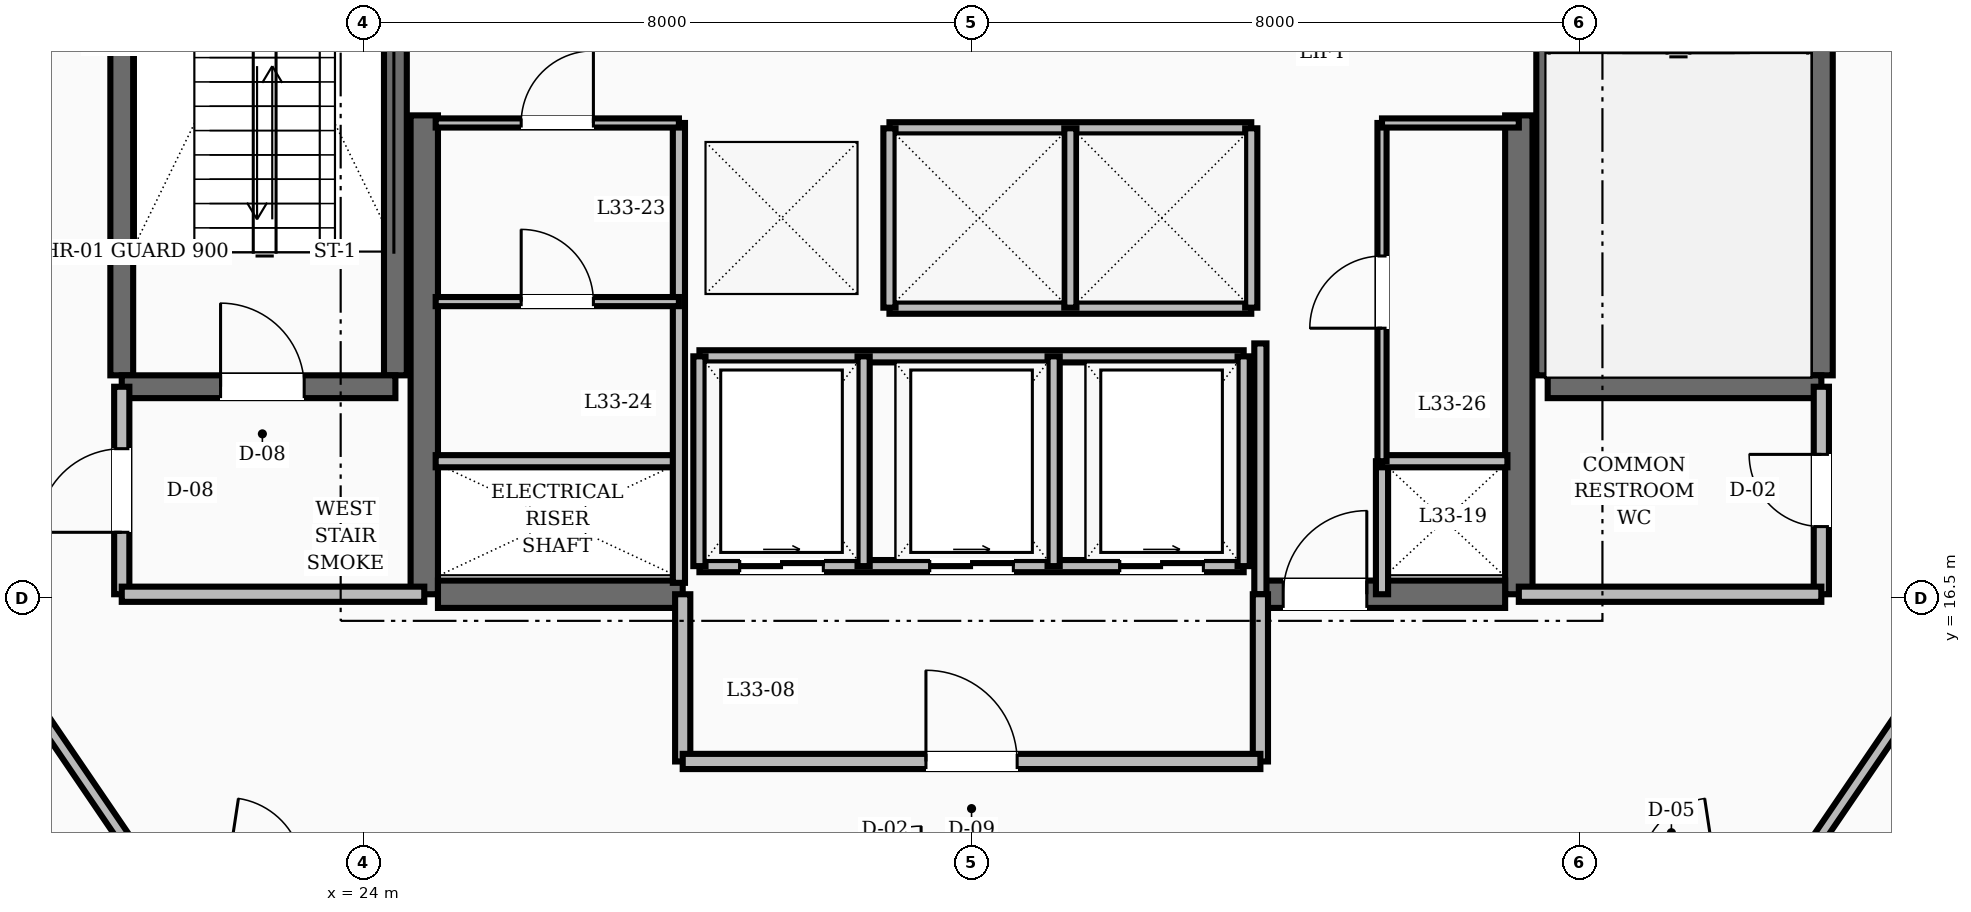
"""IFC4 building model, lengths in metres.
Left out: names, types, materials, properties, quantities, classifications, styles, units other than length and angle.
Written with IfcOpenShell. Run it as: python <this file> out.ifc"""

import sys

from ifc_helpers import new_model, si_unit, direction, frame, frame_2d, origin, place, context, subcontext, project, spatial, rectangle, extrude, element, fill, save


model = new_model("IFC4")
c1 = context("Model", 3, precision=1e-05, world=origin(), true_north=direction((0.0, 1.0)))
c2 = subcontext(c1, "Body", "Model", "MODEL_VIEW")
j1 = project(units=[si_unit("LENGTHUNIT", "METRE"), si_unit("PLANEANGLEUNIT", "RADIAN")], contexts=[c1])
p1 = place(None, origin())
s1 = spatial("IfcSite", under=j1, at=p1, CompositionType="ELEMENT")
p2 = place(p1, origin())
s2 = spatial("IfcBuilding", under=s1, at=p2, CompositionType="ELEMENT")
p3 = place(p2, frame((0.0, 0.0, 131.6)))
s3 = spatial("IfcBuildingStorey", under=s2, at=p3, CompositionType="ELEMENT", Elevation=131.6)
for number, where, z_axis, x_axis in (
    (1, (24.8, 16.55, 0.0), (0.0, 0.0, 1.0), (0.0, 1.0, 0.0)),
    (2, (39.2, 16.55, 0.0), (0.0, 0.0, 1.0), (0.0, 1.0, 0.0)),
):
    element("IfcWall", number, at=place(p3, frame(where, z_axis=z_axis, x_axis=x_axis)), inside=s3, PredefinedType="SHEAR", context=c2, shape_type="SweptSolid", body=[
        extrude(rectangle(XDim=6.3, YDim=0.36, at=frame_2d((3.15, 0.0))), origin(), (0.0, 0.0, 1.0), 3.6),
    ])
p4 = place(p3, frame((24.98, 16.55, 0.0), z_axis=(0.0, 0.0, 1.0), x_axis=(1.0, 0.0, 0.0)))
e3 = element("IfcWall", 3, at=p4, inside=s3, PredefinedType="SHEAR", context=c2, shape_type="SweptSolid", body=[
    extrude(rectangle(XDim=3.22, YDim=0.36, at=frame_2d((1.61, 0.0))), origin(), (0.0, 0.0, 1.0), 3.6),
])
p5 = place(p3, frame((35.8, 16.55, 0.0), z_axis=(0.0, 0.0, 1.0), x_axis=(1.0, 0.0, 0.0)))
e4 = element("IfcWall", 4, at=p5, inside=s3, PredefinedType="SHEAR", context=c2, shape_type="SweptSolid", body=[
    extrude(rectangle(XDim=3.22, YDim=0.36, at=frame_2d((1.61, 0.0))), origin(), (0.0, 0.0, 1.0), 3.6),
])
p6 = place(p5, frame((0.3, 0.0, 0.0)))
e5 = element("IfcOpeningElement", 5, at=p6, cuts=e4, PredefinedType="OPENING", context=c2, shape_type="SweptSolid", body=[
    extrude(rectangle(XDim=1.1, YDim=2.1, at=frame_2d((0.55, 1.05))), frame((0.0, 0.19, 0.0), z_axis=(0.0, -1.0, 0.0), x_axis=(1.0, 0.0, 0.0)), (0.0, 0.0, 1.0), 0.38),
])
for number, where, z_axis, x_axis in (
    (6, (20.82, 19.43, 0.0), (0.0, 0.0, 1.0), (0.0, 1.0, 0.0)),
    (7, (24.42, 19.43, 0.0), (0.0, 0.0, 1.0), (0.0, 1.0, 0.0)),
):
    element("IfcWall", number, at=place(p3, frame(where, z_axis=z_axis, x_axis=x_axis)), inside=s3, PredefinedType="SHEAR", context=c2, shape_type="SweptSolid", body=[
        extrude(rectangle(XDim=8.74, YDim=0.3, at=frame_2d((4.37, 0.0))), origin(), (0.0, 0.0, 1.0), 3.6),
    ])
p7 = place(p3, frame((20.82, 19.28, 0.0), z_axis=(0.0, 0.0, 1.0), x_axis=(1.0, 0.0, 0.0)))
e8 = element("IfcWall", 8, at=p7, inside=s3, PredefinedType="SHEAR", context=c2, shape_type="SweptSolid", body=[
    extrude(rectangle(XDim=3.6, YDim=0.3, at=frame_2d((1.8, 0.0))), origin(), (0.0, 0.0, 1.0), 3.6),
])
p8 = place(p7, frame((1.3, 0.0, 0.0)))
e9 = element("IfcOpeningElement", 9, at=p8, cuts=e8, PredefinedType="OPENING", context=c2, shape_type="SweptSolid", body=[
    extrude(rectangle(XDim=1.1, YDim=2.1, at=frame_2d((0.55, 1.05))), frame((0.0, 0.16, 0.0), z_axis=(0.0, -1.0, 0.0), x_axis=(1.0, 0.0, 0.0)), (0.0, 0.0, 1.0), 0.32),
])
for number, where, z_axis, x_axis in (
    (10, (43.18, 19.43, 0.0), (0.0, 0.0, 1.0), (0.0, 1.0, 0.0)),
    (11, (39.58, 19.43, 0.0), (0.0, 0.0, 1.0), (0.0, 1.0, 0.0)),
):
    element("IfcWall", number, at=place(p3, frame(where, z_axis=z_axis, x_axis=x_axis)), inside=s3, PredefinedType="SHEAR", context=c2, shape_type="SweptSolid", body=[
        extrude(rectangle(XDim=8.74, YDim=0.3, at=frame_2d((4.37, 0.0))), origin(), (0.0, 0.0, 1.0), 3.6),
    ])
p9 = place(p3, frame((39.58, 19.28, 0.0), z_axis=(0.0, 0.0, 1.0), x_axis=(1.0, 0.0, 0.0)))
e12 = element("IfcWall", 12, at=p9, inside=s3, PredefinedType="SHEAR", context=c2, shape_type="SweptSolid", body=[
    extrude(rectangle(XDim=3.6, YDim=0.3, at=frame_2d((1.8, 0.0))), origin(), (0.0, 0.0, 1.0), 3.6),
])
p10 = place(p3, frame((20.82, 16.55, 0.0), z_axis=(0.0, 0.0, 1.0), x_axis=(0.0, 1.0, 0.0)))
e13 = element("IfcWall", 13, at=p10, inside=s3, PredefinedType="SOLIDWALL", context=c2, shape_type="SweptSolid", body=[
    extrude(rectangle(XDim=2.73, YDim=0.2, at=frame_2d((1.365, 0.0))), origin(), (0.0, 0.0, 1.0), 2.8),
])
p11 = place(p10, frame((0.815, 0.0, 0.0)))
e14 = element("IfcOpeningElement", 14, at=p11, cuts=e13, PredefinedType="OPENING", context=c2, shape_type="SweptSolid", body=[
    extrude(rectangle(XDim=1.1, YDim=2.1, at=frame_2d((0.55, 1.05))), frame((0.0, 0.11, 0.0), z_axis=(0.0, -1.0, 0.0), x_axis=(1.0, 0.0, 0.0)), (0.0, 0.0, 1.0), 0.22),
])
p12 = place(p3, frame((20.82, 16.55, 0.0), z_axis=(0.0, 0.0, 1.0), x_axis=(1.0, 0.0, 0.0)))
e15 = element("IfcWall", 15, at=p12, inside=s3, PredefinedType="SOLIDWALL", context=c2, shape_type="SweptSolid", body=[
    extrude(rectangle(XDim=3.98, YDim=0.2, at=frame_2d((1.99, 0.0))), origin(), (0.0, 0.0, 1.0), 2.8),
])
p13 = place(p3, frame((43.18, 16.55, 0.0), z_axis=(0.0, 0.0, 1.0), x_axis=(0.0, 1.0, 0.0)))
e16 = element("IfcWall", 16, at=p13, inside=s3, PredefinedType="SOLIDWALL", context=c2, shape_type="SweptSolid", body=[
    extrude(rectangle(XDim=2.73, YDim=0.2, at=frame_2d((1.365, 0.0))), origin(), (0.0, 0.0, 1.0), 2.8),
])
p14 = place(p13, frame((0.89, 0.0, 0.0)))
e17 = element("IfcOpeningElement", 17, at=p14, cuts=e16, PredefinedType="OPENING", context=c2, shape_type="SweptSolid", body=[
    extrude(rectangle(XDim=0.95, YDim=2.1, at=frame_2d((0.475, 1.05))), frame((0.0, 0.11, 0.0), z_axis=(0.0, -1.0, 0.0), x_axis=(1.0, 0.0, 0.0)), (0.0, 0.0, 1.0), 0.22),
])
p15 = place(p3, frame((39.2, 16.55, 0.0), z_axis=(0.0, 0.0, 1.0), x_axis=(1.0, 0.0, 0.0)))
e18 = element("IfcWall", 18, at=p15, inside=s3, PredefinedType="SOLIDWALL", context=c2, shape_type="SweptSolid", body=[
    extrude(rectangle(XDim=3.98, YDim=0.2, at=frame_2d((1.99, 0.0))), origin(), (0.0, 0.0, 1.0), 2.8),
])
p16 = place(p3, frame((35.8, 16.55, 0.0), z_axis=(0.0, 0.0, 1.0), x_axis=(0.0, 1.0, 0.0)))
e19 = element("IfcWall", 19, at=p16, inside=s3, PredefinedType="SOLIDWALL", context=c2, shape_type="SweptSolid", body=[
    extrude(rectangle(XDim=3.3, YDim=0.16, at=frame_2d((1.65, 0.0))), origin(), (0.0, 0.0, 1.0), 2.8),
])
p17 = place(p3, frame((37.4, 16.55, 0.0), z_axis=(0.0, 0.0, 1.0), x_axis=(0.0, 1.0, 0.0)))
e20 = element("IfcWall", 20, at=p17, inside=s3, PredefinedType="SOLIDWALL", context=c2, shape_type="SweptSolid", body=[
    extrude(rectangle(XDim=1.75, YDim=0.16, at=frame_2d((0.875, 0.0))), origin(), (0.0, 0.0, 1.0), 2.8),
])
for number, where, z_axis, x_axis in (
    (21, (28.2, 14.35, 0.0), (0.0, 0.0, 1.0), (0.0, 1.0, 0.0)),
    (22, (35.8, 14.35, 0.0), (0.0, 0.0, 1.0), (0.0, 1.0, 0.0)),
):
    element("IfcWall", number, at=place(p3, frame(where, z_axis=z_axis, x_axis=x_axis)), inside=s3, PredefinedType="SOLIDWALL", context=c2, shape_type="SweptSolid", body=[
        extrude(rectangle(XDim=2.2, YDim=0.2, at=frame_2d((1.1, 0.0))), origin(), (0.0, 0.0, 1.0), 2.8),
    ])
p18 = place(p3, frame((28.2, 14.35, 0.0), z_axis=(0.0, 0.0, 1.0), x_axis=(1.0, 0.0, 0.0)))
e23 = element("IfcWall", 23, at=p18, inside=s3, PredefinedType="SOLIDWALL", context=c2, shape_type="SweptSolid", body=[
    extrude(rectangle(XDim=7.6, YDim=0.2, at=frame_2d((3.8, 0.0))), origin(), (0.0, 0.0, 1.0), 2.8),
])
p19 = place(p18, frame((3.2, 0.0, 0.0)))
e24 = element("IfcOpeningElement", 24, at=p19, cuts=e23, PredefinedType="OPENING", context=c2, shape_type="SweptSolid", body=[
    extrude(rectangle(XDim=1.2, YDim=2.1, at=frame_2d((0.6, 1.05))), frame((0.0, 0.11, 0.0), z_axis=(0.0, -1.0, 0.0), x_axis=(1.0, 0.0, 0.0)), (0.0, 0.0, 1.0), 0.22),
])
for number, where, z_axis, x_axis in (
    (25, (30.92, 22.68, 0.0), (0.0, 0.0, 1.0), (1.0, 0.0, 0.0)),
    (26, (30.92, 20.32, 0.0), (0.0, 0.0, 1.0), (1.0, 0.0, 0.0)),
):
    element("IfcWall", number, at=place(p3, frame(where, z_axis=z_axis, x_axis=x_axis)), inside=s3, PredefinedType="SOLIDWALL", context=c2, shape_type="SweptSolid", body=[
        extrude(rectangle(XDim=4.76, YDim=0.16, at=frame_2d((2.38, 0.0))), origin(), (0.0, 0.0, 1.0), 2.8),
    ])
for number, where, z_axis, x_axis in (
    (27, (30.92, 20.32, 0.0), (0.0, 0.0, 1.0), (0.0, 1.0, 0.0)),
    (28, (33.3, 20.32, 0.0), (0.0, 0.0, 1.0), (0.0, 1.0, 0.0)),
    (29, (35.68, 20.32, 0.0), (0.0, 0.0, 1.0), (0.0, 1.0, 0.0)),
):
    element("IfcWall", number, at=place(p3, frame(where, z_axis=z_axis, x_axis=x_axis)), inside=s3, PredefinedType="SOLIDWALL", context=c2, shape_type="SweptSolid", body=[
        extrude(rectangle(XDim=2.36, YDim=0.16, at=frame_2d((1.18, 0.0))), origin(), (0.0, 0.0, 1.0), 2.8),
    ])
p20 = place(p3, frame((28.42, 16.92, 0.0), z_axis=(0.0, 0.0, 1.0), x_axis=(1.0, 0.0, 0.0)))
e30 = element("IfcWall", 30, at=p20, inside=s3, PredefinedType="SOLIDWALL", context=c2, shape_type="SweptSolid", body=[
    extrude(rectangle(XDim=7.16, YDim=0.16, at=frame_2d((3.58, 0.0))), origin(), (0.0, 0.0, 1.0), 2.8),
])
p21 = place(p20, frame((0.53, 0.0, 0.0)))
e31 = element("IfcOpeningElement", 31, at=p21, cuts=e30, PredefinedType="OPENING", context=c2, shape_type="SweptSolid", body=[
    extrude(rectangle(XDim=1.1, YDim=2.15, at=frame_2d((0.55, 1.075))), frame((0.0, 0.09, 0.0), z_axis=(0.0, -1.0, 0.0), x_axis=(1.0, 0.0, 0.0)), (0.0, 0.0, 1.0), 0.18),
])
p22 = place(p20, frame((3.03, 0.0, 0.0)))
e32 = element("IfcOpeningElement", 32, at=p22, cuts=e30, PredefinedType="OPENING", context=c2, shape_type="SweptSolid", body=[
    extrude(rectangle(XDim=1.1, YDim=2.15, at=frame_2d((0.55, 1.075))), frame((0.0, 0.09, 0.0), z_axis=(0.0, -1.0, 0.0), x_axis=(1.0, 0.0, 0.0)), (0.0, 0.0, 1.0), 0.18),
])
p23 = place(p20, frame((5.53, 0.0, 0.0)))
e33 = element("IfcOpeningElement", 33, at=p23, cuts=e30, PredefinedType="OPENING", context=c2, shape_type="SweptSolid", body=[
    extrude(rectangle(XDim=1.1, YDim=2.15, at=frame_2d((0.55, 1.075))), frame((0.0, 0.09, 0.0), z_axis=(0.0, -1.0, 0.0), x_axis=(1.0, 0.0, 0.0)), (0.0, 0.0, 1.0), 0.18),
])
p24 = place(p3, frame((28.42, 19.68, 0.0), z_axis=(0.0, 0.0, 1.0), x_axis=(1.0, 0.0, 0.0)))
e34 = element("IfcWall", 34, at=p24, inside=s3, PredefinedType="SOLIDWALL", context=c2, shape_type="SweptSolid", body=[
    extrude(rectangle(XDim=7.16, YDim=0.16, at=frame_2d((3.58, 0.0))), origin(), (0.0, 0.0, 1.0), 2.8),
])
for number, where, z_axis, x_axis in (
    (35, (28.42, 16.92, 0.0), (0.0, 0.0, 1.0), (0.0, 1.0, 0.0)),
    (36, (30.58, 16.92, 0.0), (0.0, 0.0, 1.0), (0.0, 1.0, 0.0)),
    (37, (33.08, 16.92, 0.0), (0.0, 0.0, 1.0), (0.0, 1.0, 0.0)),
    (38, (35.58, 16.92, 0.0), (0.0, 0.0, 1.0), (0.0, 1.0, 0.0)),
):
    element("IfcWall", number, at=place(p3, frame(where, z_axis=z_axis, x_axis=x_axis)), inside=s3, PredefinedType="SOLIDWALL", context=c2, shape_type="SweptSolid", body=[
        extrude(rectangle(XDim=2.76, YDim=0.16, at=frame_2d((1.38, 0.0))), origin(), (0.0, 0.0, 1.0), 2.8),
    ])
p25 = place(p3, frame((24.95, 18.3, 0.0), z_axis=(0.0, 0.0, 1.0), x_axis=(1.0, 0.0, 0.0)))
e39 = element("IfcWall", 39, at=p25, inside=s3, PredefinedType="SOLIDWALL", context=c2, shape_type="SweptSolid", body=[
    extrude(rectangle(XDim=3.2, YDim=0.16, at=frame_2d((1.6, 0.0))), origin(), (0.0, 0.0, 1.0), 2.8),
])
p26 = place(p3, frame((28.15, 16.7, 0.0), z_axis=(0.0, 0.0, 1.0), x_axis=(0.0, 1.0, 0.0)))
e40 = element("IfcWall", 40, at=p26, inside=s3, PredefinedType="SOLIDWALL", context=c2, shape_type="SweptSolid", body=[
    extrude(rectangle(XDim=6.05, YDim=0.16, at=frame_2d((3.025, 0.0))), origin(), (0.0, 0.0, 1.0), 2.8),
])
p27 = place(p3, frame((37.4, 18.3, 0.0), z_axis=(0.0, 0.0, 1.0), x_axis=(1.0, 0.0, 0.0)))
e41 = element("IfcWall", 41, at=p27, inside=s3, PredefinedType="SOLIDWALL", context=c2, shape_type="SweptSolid", body=[
    extrude(rectangle(XDim=1.65, YDim=0.16, at=frame_2d((0.825, 0.0))), origin(), (0.0, 0.0, 1.0), 2.8),
])
p28 = place(p3, frame((24.95, 22.75, 0.0), z_axis=(0.0, 0.0, 1.0), x_axis=(1.0, 0.0, 0.0)))
e42 = element("IfcWall", 42, at=p28, inside=s3, PredefinedType="PARTITIONING", context=c2, shape_type="SweptSolid", body=[
    extrude(rectangle(XDim=3.2, YDim=0.12, at=frame_2d((1.6, 0.0))), origin(), (0.0, 0.0, 1.0), 2.8),
])
p29 = place(p28, frame((1.125, 0.0, 0.0)))
e43 = element("IfcOpeningElement", 43, at=p29, cuts=e42, PredefinedType="OPENING", context=c2, shape_type="SweptSolid", body=[
    extrude(rectangle(XDim=0.95, YDim=2.1, at=frame_2d((0.475, 1.05))), frame((0.0, 0.07, 0.0), z_axis=(0.0, -1.0, 0.0), x_axis=(1.0, 0.0, 0.0)), (0.0, 0.0, 1.0), 0.14),
])
p30 = place(p3, frame((37.4, 18.3, 0.0), z_axis=(0.0, 0.0, 1.0), x_axis=(0.0, 1.0, 0.0)))
e44 = element("IfcWall", 44, at=p30, inside=s3, PredefinedType="PARTITIONING", context=c2, shape_type="SweptSolid", body=[
    extrude(rectangle(XDim=4.45, YDim=0.12, at=frame_2d((2.225, 0.0))), origin(), (0.0, 0.0, 1.0), 2.8),
])
p31 = place(p30, frame((1.75, 0.0, 0.0)))
e45 = element("IfcOpeningElement", 45, at=p31, cuts=e44, PredefinedType="OPENING", context=c2, shape_type="SweptSolid", body=[
    extrude(rectangle(XDim=0.95, YDim=2.1, at=frame_2d((0.475, 1.05))), frame((0.0, 0.07, 0.0), z_axis=(0.0, -1.0, 0.0), x_axis=(1.0, 0.0, 0.0)), (0.0, 0.0, 1.0), 0.14),
])
p32 = place(p3, frame((37.4, 22.75, 0.0), z_axis=(0.0, 0.0, 1.0), x_axis=(1.0, 0.0, 0.0)))
e46 = element("IfcWall", 46, at=p32, inside=s3, PredefinedType="PARTITIONING", context=c2, shape_type="SweptSolid", body=[
    extrude(rectangle(XDim=1.8, YDim=0.12, at=frame_2d((0.9, 0.0))), origin(), (0.0, 0.0, 1.0), 2.8),
])
p33 = place(p3, frame((24.95, 20.4, 0.0), z_axis=(0.0, 0.0, 1.0), x_axis=(1.0, 0.0, 0.0)))
e47 = element("IfcWall", 47, at=p33, inside=s3, PredefinedType="PARTITIONING", context=c2, shape_type="SweptSolid", body=[
    extrude(rectangle(XDim=3.2, YDim=0.12, at=frame_2d((1.6, 0.0))), origin(), (0.0, 0.0, 1.0), 2.8),
])
p34 = place(p33, frame((1.125, 0.0, 0.0)))
e48 = element("IfcOpeningElement", 48, at=p34, cuts=e47, PredefinedType="OPENING", context=c2, shape_type="SweptSolid", body=[
    extrude(rectangle(XDim=0.95, YDim=2.1, at=frame_2d((0.475, 1.05))), frame((0.0, 0.07, 0.0), z_axis=(0.0, -1.0, 0.0), x_axis=(1.0, 0.0, 0.0)), (0.0, 0.0, 1.0), 0.14),
])
for number, where, z_axis, x_axis in (
    (49, (19.35, 15.548, 0.0), (0.0, 0.0, 1.0), (0.563, -0.827, 0.0)),
    (50, (42.95, 13.05, 0.0), (0.0, 0.0, 1.0), (0.563, 0.827, 0.0)),
):
    element("IfcWall", number, at=place(p3, frame(where, z_axis=z_axis, x_axis=x_axis)), inside=s3, PredefinedType="SOLIDWALL", context=c2, shape_type="SweptSolid", body=[
        extrude(rectangle(XDim=3.021, YDim=0.16, at=frame_2d((1.511, 0.0))), origin(), (0.0, 0.0, 1.0), 2.8),
    ])
p35 = place(p8, origin())
e51 = element("IfcDoor", 51, at=p35, inside=s3, OperationType="SINGLE_SWING_LEFT", PredefinedType="DOOR", context=c2, shape_type="SweptSolid", body=[
    extrude(rectangle(XDim=1.1, YDim=2.1, at=frame_2d((0.55, 1.05))), frame((0.0, 0.025, 0.0), z_axis=(0.0, -1.0, 0.0), x_axis=(1.0, 0.0, 0.0)), (0.0, 0.0, 1.0), 0.05),
])
fill(e9, e51)
p36 = place(p11, origin())
e52 = element("IfcDoor", 52, at=p36, inside=s3, OperationType="SINGLE_SWING_LEFT", PredefinedType="DOOR", context=c2, shape_type="SweptSolid", body=[
    extrude(rectangle(XDim=1.1, YDim=2.1, at=frame_2d((0.55, 1.05))), frame((0.0, 0.025, 0.0), z_axis=(0.0, -1.0, 0.0), x_axis=(1.0, 0.0, 0.0)), (0.0, 0.0, 1.0), 0.05),
])
fill(e14, e52)
p37 = place(p14, origin())
e53 = element("IfcDoor", 53, at=p37, inside=s3, OperationType="SINGLE_SWING_RIGHT", PredefinedType="DOOR", context=c2, shape_type="SweptSolid", body=[
    extrude(rectangle(XDim=0.95, YDim=2.1, at=frame_2d((0.475, 1.05))), frame((0.0, 0.025, 0.0), z_axis=(0.0, -1.0, 0.0), x_axis=(1.0, 0.0, 0.0)), (0.0, 0.0, 1.0), 0.05),
])
fill(e17, e53)
p38 = place(p6, origin())
e54 = element("IfcDoor", 54, at=p38, inside=s3, OperationType="SINGLE_SWING_RIGHT", PredefinedType="DOOR", context=c2, shape_type="SweptSolid", body=[
    extrude(rectangle(XDim=1.1, YDim=2.1, at=frame_2d((0.55, 1.05))), frame((0.0, 0.025, 0.0), z_axis=(0.0, -1.0, 0.0), x_axis=(1.0, 0.0, 0.0)), (0.0, 0.0, 1.0), 0.05),
])
fill(e5, e54)
p39 = place(p19, origin())
e55 = element("IfcDoor", 55, at=p39, inside=s3, OperationType="SINGLE_SWING_LEFT", PredefinedType="DOOR", context=c2, shape_type="SweptSolid", body=[
    extrude(rectangle(XDim=1.2, YDim=2.1, at=frame_2d((0.6, 1.05))), frame((0.0, 0.025, 0.0), z_axis=(0.0, -1.0, 0.0), x_axis=(1.0, 0.0, 0.0)), (0.0, 0.0, 1.0), 0.05),
])
fill(e24, e55)
p40 = place(p21, origin())
e56 = element("IfcDoor", 56, at=p40, inside=s3, OperationType="SLIDING_TO_RIGHT", PredefinedType="DOOR", context=c2, shape_type="SweptSolid", body=[
    extrude(rectangle(XDim=1.1, YDim=2.15, at=frame_2d((0.55, 1.075))), frame((0.0, 0.025, 0.0), z_axis=(0.0, -1.0, 0.0), x_axis=(1.0, 0.0, 0.0)), (0.0, 0.0, 1.0), 0.05),
])
fill(e31, e56)
p41 = place(p22, origin())
e57 = element("IfcDoor", 57, at=p41, inside=s3, OperationType="SLIDING_TO_RIGHT", PredefinedType="DOOR", context=c2, shape_type="SweptSolid", body=[
    extrude(rectangle(XDim=1.1, YDim=2.15, at=frame_2d((0.55, 1.075))), frame((0.0, 0.025, 0.0), z_axis=(0.0, -1.0, 0.0), x_axis=(1.0, 0.0, 0.0)), (0.0, 0.0, 1.0), 0.05),
])
fill(e32, e57)
p42 = place(p23, origin())
e58 = element("IfcDoor", 58, at=p42, inside=s3, OperationType="SLIDING_TO_RIGHT", PredefinedType="DOOR", context=c2, shape_type="SweptSolid", body=[
    extrude(rectangle(XDim=1.1, YDim=2.15, at=frame_2d((0.55, 1.075))), frame((0.0, 0.025, 0.0), z_axis=(0.0, -1.0, 0.0), x_axis=(1.0, 0.0, 0.0)), (0.0, 0.0, 1.0), 0.05),
])
fill(e33, e58)
p43 = place(p29, origin())
e59 = element("IfcDoor", 59, at=p43, inside=s3, OperationType="SINGLE_SWING_RIGHT", PredefinedType="DOOR", context=c2, shape_type="SweptSolid", body=[
    extrude(rectangle(XDim=0.95, YDim=2.1, at=frame_2d((0.475, 1.05))), frame((0.0, 0.025, 0.0), z_axis=(0.0, -1.0, 0.0), x_axis=(1.0, 0.0, 0.0)), (0.0, 0.0, 1.0), 0.05),
])
fill(e43, e59)
p44 = place(p34, origin())
e60 = element("IfcDoor", 60, at=p44, inside=s3, OperationType="SINGLE_SWING_LEFT", PredefinedType="DOOR", context=c2, shape_type="SweptSolid", body=[
    extrude(rectangle(XDim=0.95, YDim=2.1, at=frame_2d((0.475, 1.05))), frame((0.0, 0.025, 0.0), z_axis=(0.0, -1.0, 0.0), x_axis=(1.0, 0.0, 0.0)), (0.0, 0.0, 1.0), 0.05),
])
fill(e48, e60)
p45 = place(p31, origin())
e61 = element("IfcDoor", 61, at=p45, inside=s3, OperationType="SINGLE_SWING_LEFT", PredefinedType="DOOR", context=c2, shape_type="SweptSolid", body=[
    extrude(rectangle(XDim=0.95, YDim=2.1, at=frame_2d((0.475, 1.05))), frame((0.0, 0.025, 0.0), z_axis=(0.0, -1.0, 0.0), x_axis=(1.0, 0.0, 0.0)), (0.0, 0.0, 1.0), 0.05),
])
fill(e45, e61)
save(model, sys.argv[1])
